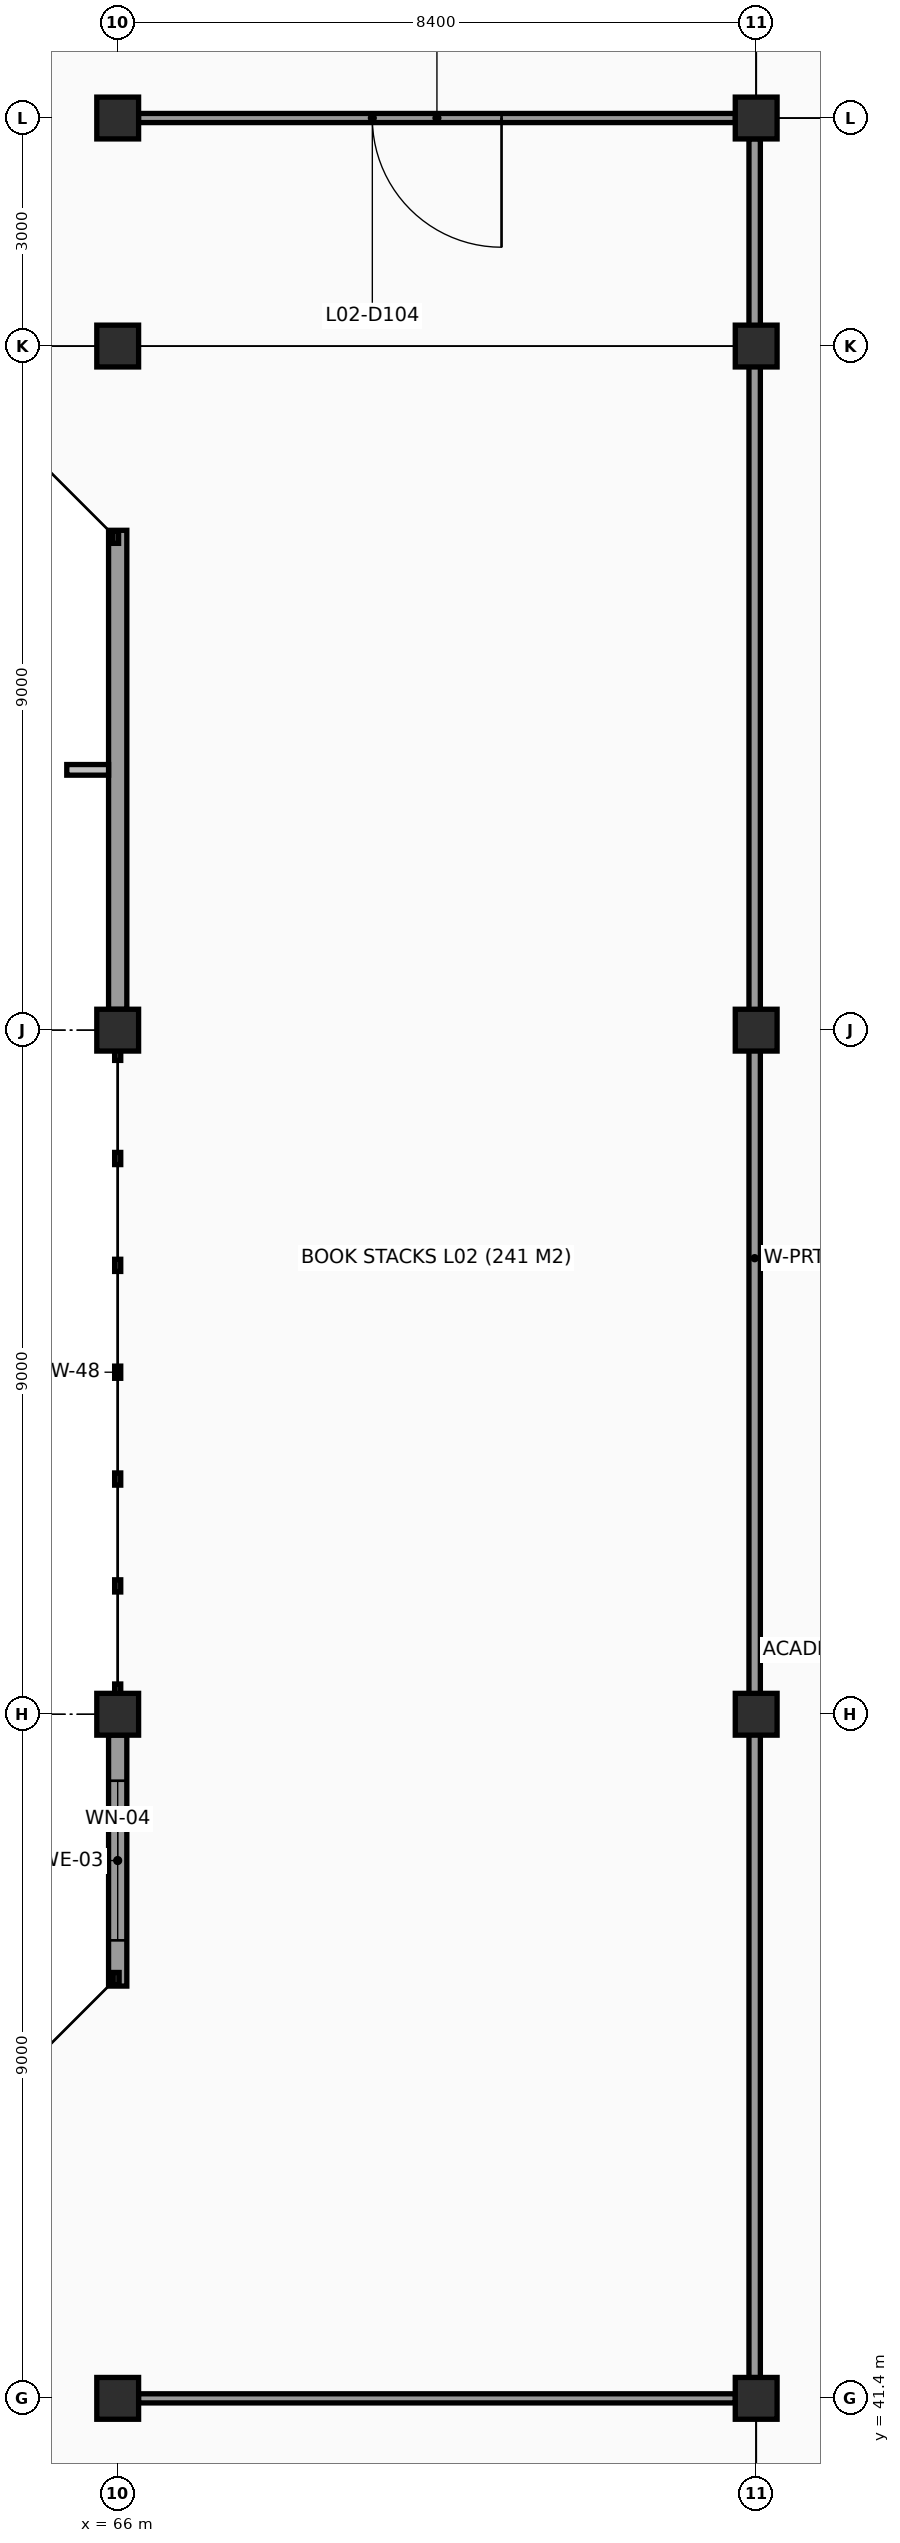
"""IFC4 building model, lengths in metres.
Left out: names, types, materials, properties, quantities, classifications, styles, units other than length and angle.
Written with IfcOpenShell. Run it as: python <this file> out.ifc"""

import sys

from ifc_helpers import new_model, si_unit, direction, frame, frame_2d, origin, origin_2d, place, context, subcontext, project, spatial, rectangle, extrude, element, fill, save


model = new_model("IFC4")
c1 = context("Model", 3, precision=1e-05, world=origin(), true_north=direction((0.0, 1.0)))
c2 = subcontext(c1, "Body", "Model", "MODEL_VIEW")
j1 = project(units=[si_unit("LENGTHUNIT", "METRE"), si_unit("PLANEANGLEUNIT", "RADIAN")], contexts=[c1])
p1 = place(None, origin())
s1 = spatial("IfcSite", under=j1, at=p1, CompositionType="ELEMENT")
p2 = place(p1, origin())
s2 = spatial("IfcBuilding", under=s1, at=p2, CompositionType="ELEMENT")
p3 = place(p2, frame((0.0, 0.0, 7.8)))
s3 = spatial("IfcBuildingStorey", under=s2, at=p3, CompositionType="ELEMENT", Elevation=7.8)
for number, where, z_axis, x_axis in (
    (1, (66.0, 41.4, 0.0), (0.0, 0.0, 1.0), (1.0, 0.0, 0.0)),
    (2, (66.0, 50.4, 0.0), (0.0, 0.0, 1.0), (1.0, 0.0, 0.0)),
    (3, (66.0, 59.4, 0.0), (0.0, 0.0, 1.0), (1.0, 0.0, 0.0)),
    (4, (66.0, 68.4, 0.0), (0.0, 0.0, 1.0), (1.0, 0.0, 0.0)),
    (5, (66.0, 71.4, 0.0), (0.0, 0.0, 1.0), (1.0, 0.0, 0.0)),
    (6, (74.4, 41.4, 0.0), (0.0, 0.0, 1.0), (1.0, 0.0, 0.0)),
    (7, (74.4, 50.4, 0.0), (0.0, 0.0, 1.0), (1.0, 0.0, 0.0)),
    (8, (74.4, 59.4, 0.0), (0.0, 0.0, 1.0), (1.0, 0.0, 0.0)),
    (9, (74.4, 68.4, 0.0), (0.0, 0.0, 1.0), (1.0, 0.0, 0.0)),
    (10, (74.4, 71.4, 0.0), (0.0, 0.0, 1.0), (1.0, 0.0, 0.0)),
):
    element("IfcColumn", number, at=place(p3, frame(where, z_axis=z_axis, x_axis=x_axis)), inside=s3, PredefinedType="COLUMN", context=c2, shape_type="SweptSolid", body=[
        extrude(rectangle(XDim=0.55, YDim=0.55, at=origin_2d()), origin(), (0.0, 0.0, 1.0), 3.6),
    ])
p4 = place(p3, frame((66.0, 46.824, 0.0), z_axis=(0.0, 0.0, 1.0), x_axis=(0.0, 1.0, 0.0)))
e11 = element("IfcWall", 11, at=p4, inside=s3, PredefinedType="SOLIDWALL", context=c2, shape_type="SweptSolid", body=[
    extrude(rectangle(XDim=3.303, YDim=0.24, at=frame_2d((1.651, 0.0))), origin(), (0.0, 0.0, 1.0), 2.65),
])
p5 = place(p4, frame((0.602, 0.0, 0.95)))
e12 = element("IfcOpeningElement", 12, at=p5, cuts=e11, PredefinedType="OPENING", context=c2, shape_type="SweptSolid", body=[
    extrude(rectangle(XDim=2.1, YDim=1.2, at=frame_2d((1.05, 0.6))), frame((0.0, 0.13, 0.0), z_axis=(0.0, -1.0, 0.0), x_axis=(1.0, 0.0, 0.0)), (0.0, 0.0, 1.0), 0.26),
])
p6 = place(p3, frame((66.0, 59.673, 0.0), z_axis=(0.0, 0.0, 1.0), x_axis=(0.0, 1.0, 0.0)))
e13 = element("IfcWall", 13, at=p6, inside=s3, PredefinedType="SOLIDWALL", context=c2, shape_type="SweptSolid", body=[
    extrude(rectangle(XDim=6.303, YDim=0.24, at=frame_2d((3.151, 0.0))), origin(), (0.0, 0.0, 1.0), 2.6),
])
p7 = place(p3, frame((66.273, 71.4, 0.0), z_axis=(0.0, 0.0, 1.0), x_axis=(1.0, 0.0, 0.0)))
e14 = element("IfcWall", 14, at=p7, inside=s3, PredefinedType="PARTITIONING", context=c2, shape_type="SweptSolid", body=[
    extrude(rectangle(XDim=7.854, YDim=0.12, at=frame_2d((3.927, 0.0))), origin(), (0.0, 0.0, 1.0), 2.85),
])
p8 = place(p7, frame((3.077, 0.0, 0.0)))
e15 = element("IfcOpeningElement", 15, at=p8, cuts=e14, PredefinedType="OPENING", context=c2, shape_type="SweptSolid", body=[
    extrude(rectangle(XDim=1.7, YDim=2.2, at=frame_2d((0.85, 1.1))), frame((0.0, 0.07, 0.0), z_axis=(0.0, -1.0, 0.0), x_axis=(1.0, 0.0, 0.0)), (0.0, 0.0, 1.0), 0.14),
])
p9 = place(p3, frame((74.38, 71.127, 0.0), z_axis=(0.0, 0.0, 1.0), x_axis=(0.0, -1.0, 0.0)))
e16 = element("IfcWall", 16, at=p9, inside=s3, PredefinedType="PARTITIONING", context=c2, shape_type="SweptSolid", body=[
    extrude(rectangle(XDim=29.454, YDim=0.15, at=frame_2d((14.727, 0.0))), origin(), (0.0, 0.0, 1.0), 2.7),
])
p10 = place(p3, frame((74.127, 41.4, 0.0), z_axis=(0.0, 0.0, 1.0), x_axis=(-1.0, 0.0, 0.0)))
e17 = element("IfcWall", 17, at=p10, inside=s3, PredefinedType="PARTITIONING", context=c2, shape_type="SweptSolid", body=[
    extrude(rectangle(XDim=7.854, YDim=0.12, at=frame_2d((3.927, 0.0))), origin(), (0.0, 0.0, 1.0), 2.91),
])
p11 = place(p5, origin())
e18 = element("IfcWindow", 18, at=p11, inside=s3, PartitioningType="SINGLE_PANEL", PredefinedType="WINDOW", context=c2, shape_type="SweptSolid", body=[
    extrude(rectangle(XDim=2.1, YDim=1.2, at=frame_2d((1.05, 0.6))), frame((0.0, 0.03, 0.0), z_axis=(0.0, -1.0, 0.0), x_axis=(1.0, 0.0, 0.0)), (0.0, 0.0, 1.0), 0.06),
])
fill(e12, e18)
p12 = place(p8, origin())
e19 = element("IfcDoor", 19, at=p12, inside=s3, OperationType="DOUBLE_DOOR_SINGLE_SWING", PredefinedType="DOOR", context=c2, shape_type="SweptSolid", body=[
    extrude(rectangle(XDim=1.7, YDim=2.2, at=frame_2d((0.85, 1.1))), frame((0.0, 0.025, 0.0), z_axis=(0.0, -1.0, 0.0), x_axis=(1.0, 0.0, 0.0)), (0.0, 0.0, 1.0), 0.05),
])
fill(e15, e19)
save(model, sys.argv[1])
